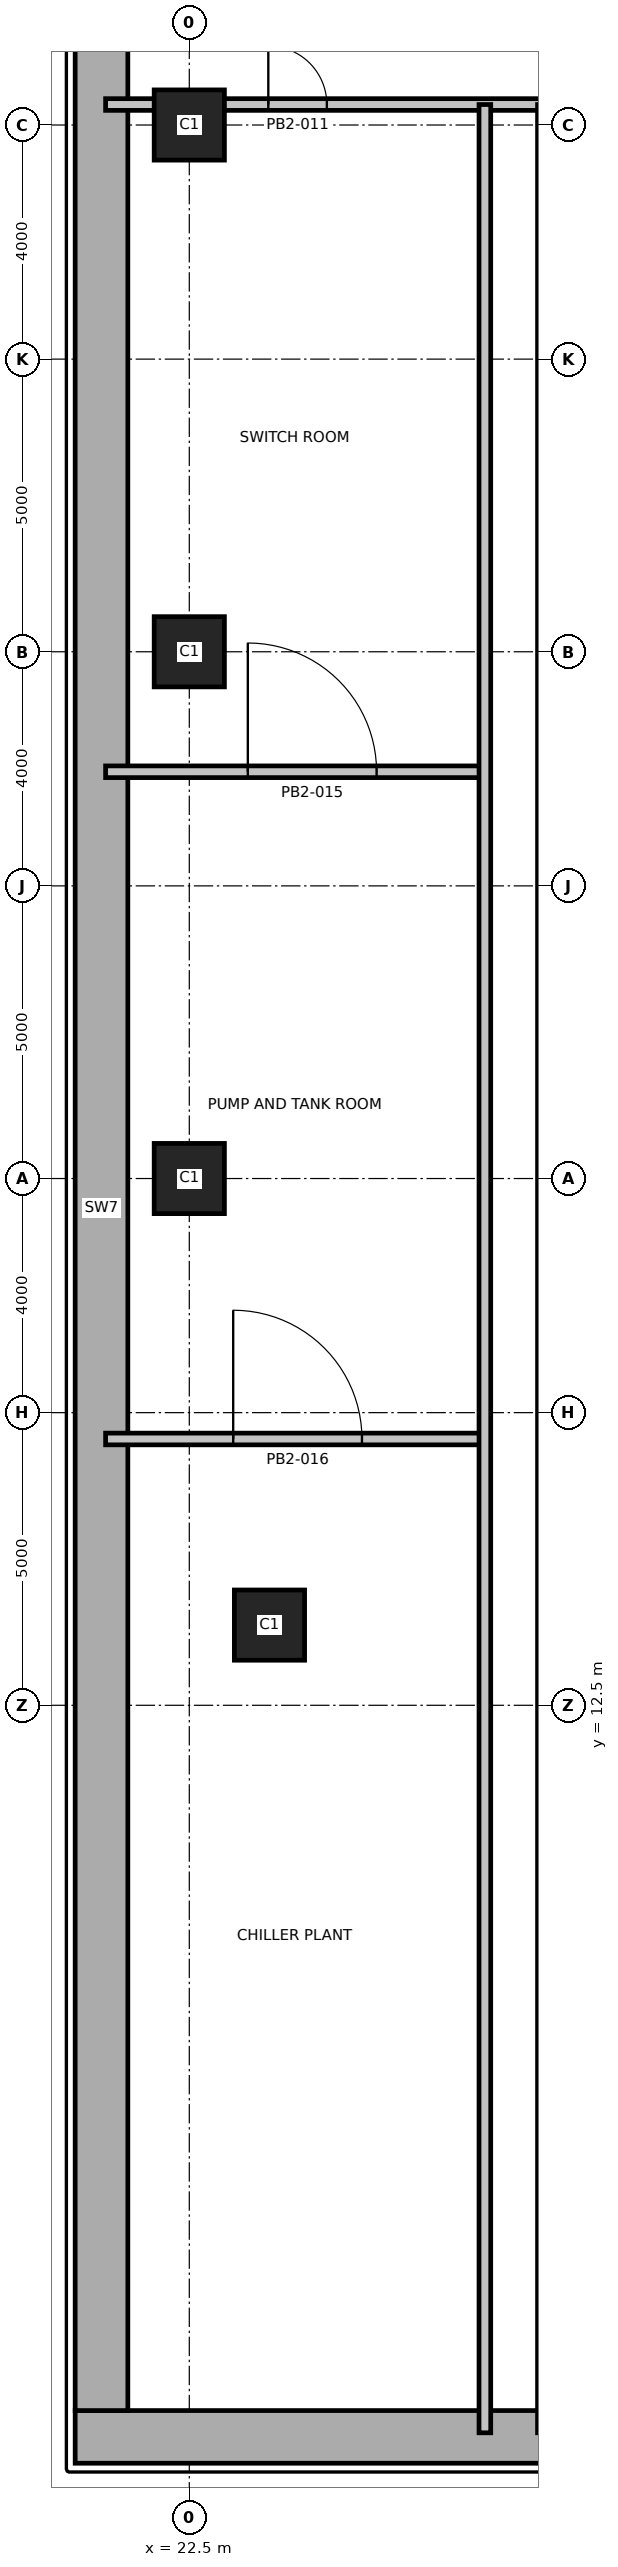
"""IFC4 building model, lengths in metres.
Left out: names, types, materials, properties, quantities, classifications, styles, units other than length and angle.
Written with IfcOpenShell. Run it as: python <this file> out.ifc"""

import sys

from ifc_helpers import new_model, si_unit, direction, frame, frame_2d, origin, origin_2d, place, context, subcontext, project, spatial, rectangle, extrude, element, fill, save


model = new_model("IFC4")
c1 = context("Model", 3, precision=1e-05, world=origin(), true_north=direction((0.0, 1.0)))
c2 = subcontext(c1, "Body", "Model", "MODEL_VIEW")
j1 = project(units=[si_unit("LENGTHUNIT", "METRE"), si_unit("PLANEANGLEUNIT", "RADIAN")], contexts=[c1])
p1 = place(None, origin())
s1 = spatial("IfcSite", under=j1, at=p1, CompositionType="ELEMENT")
p2 = place(p1, origin())
s2 = spatial("IfcBuilding", under=s1, at=p2, CompositionType="ELEMENT")
p3 = place(p2, frame((0.0, 0.0, -9.0)))
s3 = spatial("IfcBuildingStorey", under=s2, at=p3, CompositionType="ELEMENT", Elevation=-9.0)
for number, where, z_axis, x_axis in (
    (1, (23.87, 13.87, 0.0), (0.0, 0.0, 1.0), (1.0, 0.0, 0.0)),
    (2, (22.5, 21.5, 0.0), (0.0, 0.0, 1.0), (1.0, 0.0, 0.0)),
    (3, (22.5, 30.5, 0.0), (0.0, 0.0, 1.0), (1.0, 0.0, 0.0)),
    (4, (22.5, 39.5, 0.0), (0.0, 0.0, 1.0), (1.0, 0.0, 0.0)),
):
    element("IfcColumn", number, at=place(p3, frame(where, z_axis=z_axis, x_axis=x_axis)), inside=s3, PredefinedType="COLUMN", context=c2, shape_type="SweptSolid", body=[
        extrude(rectangle(XDim=1.2, YDim=1.2, at=origin_2d()), origin(), (0.0, 0.0, 1.0), 4.5),
    ])
p4 = place(p3, frame((20.55, 0.0, 0.0), z_axis=(0.0, 0.0, 1.0), x_axis=(1.0, 0.0, 0.0)))
e5 = element("IfcWall", 5, at=p4, inside=s3, PredefinedType="SOLIDWALL", context=c2, shape_type="SweptSolid", body=[
    extrude(rectangle(XDim=84.9, YDim=0.9, at=frame_2d((42.45, 0.0))), origin(), (0.0, 0.0, 1.0), 4.5),
])
p5 = place(p3, frame((21.0, 41.55, 0.0), z_axis=(0.0, 0.0, 1.0), x_axis=(0.0, -1.0, 0.0)))
e6 = element("IfcWall", 6, at=p5, inside=s3, PredefinedType="SOLIDWALL", context=c2, shape_type="SweptSolid", body=[
    extrude(rectangle(XDim=41.1, YDim=0.9, at=frame_2d((20.55, 0.0))), origin(), (0.0, 0.0, 1.0), 4.5),
])
p6 = place(p3, frame((21.07, 17.05, 0.0), z_axis=(0.0, 0.0, 1.0), x_axis=(1.0, 0.0, 0.0)))
e7 = element("IfcWall", 7, at=p6, inside=s3, PredefinedType="PARTITIONING", context=c2, shape_type="SweptSolid", body=[
    extrude(rectangle(XDim=6.48, YDim=0.2, at=frame_2d((3.24, 0.0))), origin(), (0.0, 0.0, 1.0), 4.2),
])
p7 = place(p6, frame((2.18, 0.0, 0.0)))
e8 = element("IfcOpeningElement", 8, at=p7, cuts=e7, PredefinedType="OPENING", context=c2, shape_type="SweptSolid", body=[
    extrude(rectangle(XDim=2.2, YDim=2.4, at=frame_2d((1.1, 1.2))), frame((0.0, 0.11, 0.0), z_axis=(0.0, -1.0, 0.0), x_axis=(1.0, 0.0, 0.0)), (0.0, 0.0, 1.0), 0.22),
])
p8 = place(p3, frame((21.07, 28.45, 0.0), z_axis=(0.0, 0.0, 1.0), x_axis=(1.0, 0.0, 0.0)))
e9 = element("IfcWall", 9, at=p8, inside=s3, PredefinedType="PARTITIONING", context=c2, shape_type="SweptSolid", body=[
    extrude(rectangle(XDim=6.48, YDim=0.2, at=frame_2d((3.24, 0.0))), origin(), (0.0, 0.0, 1.0), 4.2),
])
p9 = place(p8, frame((2.43, 0.0, 0.0)))
e10 = element("IfcOpeningElement", 10, at=p9, cuts=e9, PredefinedType="OPENING", context=c2, shape_type="SweptSolid", body=[
    extrude(rectangle(XDim=2.2, YDim=2.4, at=frame_2d((1.1, 1.2))), frame((0.0, 0.11, 0.0), z_axis=(0.0, -1.0, 0.0), x_axis=(1.0, 0.0, 0.0)), (0.0, 0.0, 1.0), 0.22),
])
p10 = place(p3, frame((21.07, 39.85, 0.0), z_axis=(0.0, 0.0, 1.0), x_axis=(1.0, 0.0, 0.0)))
e11 = element("IfcWall", 11, at=p10, inside=s3, PredefinedType="PARTITIONING", context=c2, shape_type="SweptSolid", body=[
    extrude(rectangle(XDim=7.48, YDim=0.2, at=frame_2d((3.74, 0.0))), origin(), (0.0, 0.0, 1.0), 4.2),
])
p11 = place(p10, frame((2.78, 0.0, 0.0)))
e12 = element("IfcOpeningElement", 12, at=p11, cuts=e11, PredefinedType="OPENING", context=c2, shape_type="SweptSolid", body=[
    extrude(rectangle(XDim=1.0, YDim=2.1, at=frame_2d((0.5, 1.05))), frame((0.0, 0.11, 0.0), z_axis=(0.0, -1.0, 0.0), x_axis=(1.0, 0.0, 0.0)), (0.0, 0.0, 1.0), 0.22),
])
p12 = place(p3, frame((27.55, 0.07, 0.0), z_axis=(0.0, 0.0, 1.0), x_axis=(0.0, 1.0, 0.0)))
e13 = element("IfcWall", 13, at=p12, inside=s3, PredefinedType="PARTITIONING", context=c2, shape_type="SweptSolid", body=[
    extrude(rectangle(XDim=39.78, YDim=0.2, at=frame_2d((19.89, 0.0))), origin(), (0.0, 0.0, 1.0), 4.2),
])
p13 = place(p11, origin())
e14 = element("IfcDoor", 14, at=p13, inside=s3, OperationType="SINGLE_SWING_LEFT", PredefinedType="DOOR", context=c2, shape_type="SweptSolid", body=[
    extrude(rectangle(XDim=1.0, YDim=2.1, at=frame_2d((0.5, 1.05))), frame((0.0, 0.025, 0.0), z_axis=(0.0, -1.0, 0.0), x_axis=(1.0, 0.0, 0.0)), (0.0, 0.0, 1.0), 0.05),
])
fill(e12, e14)
p14 = place(p9, origin())
e15 = element("IfcDoor", 15, at=p14, inside=s3, OperationType="SINGLE_SWING_LEFT", PredefinedType="DOOR", context=c2, shape_type="SweptSolid", body=[
    extrude(rectangle(XDim=2.2, YDim=2.4, at=frame_2d((1.1, 1.2))), frame((0.0, 0.025, 0.0), z_axis=(0.0, -1.0, 0.0), x_axis=(1.0, 0.0, 0.0)), (0.0, 0.0, 1.0), 0.05),
])
fill(e10, e15)
p15 = place(p7, origin())
e16 = element("IfcDoor", 16, at=p15, inside=s3, OperationType="SINGLE_SWING_RIGHT", PredefinedType="DOOR", context=c2, shape_type="SweptSolid", body=[
    extrude(rectangle(XDim=2.2, YDim=2.4, at=frame_2d((1.1, 1.2))), frame((0.0, 0.025, 0.0), z_axis=(0.0, -1.0, 0.0), x_axis=(1.0, 0.0, 0.0)), (0.0, 0.0, 1.0), 0.05),
])
fill(e8, e16)
save(model, sys.argv[1])
